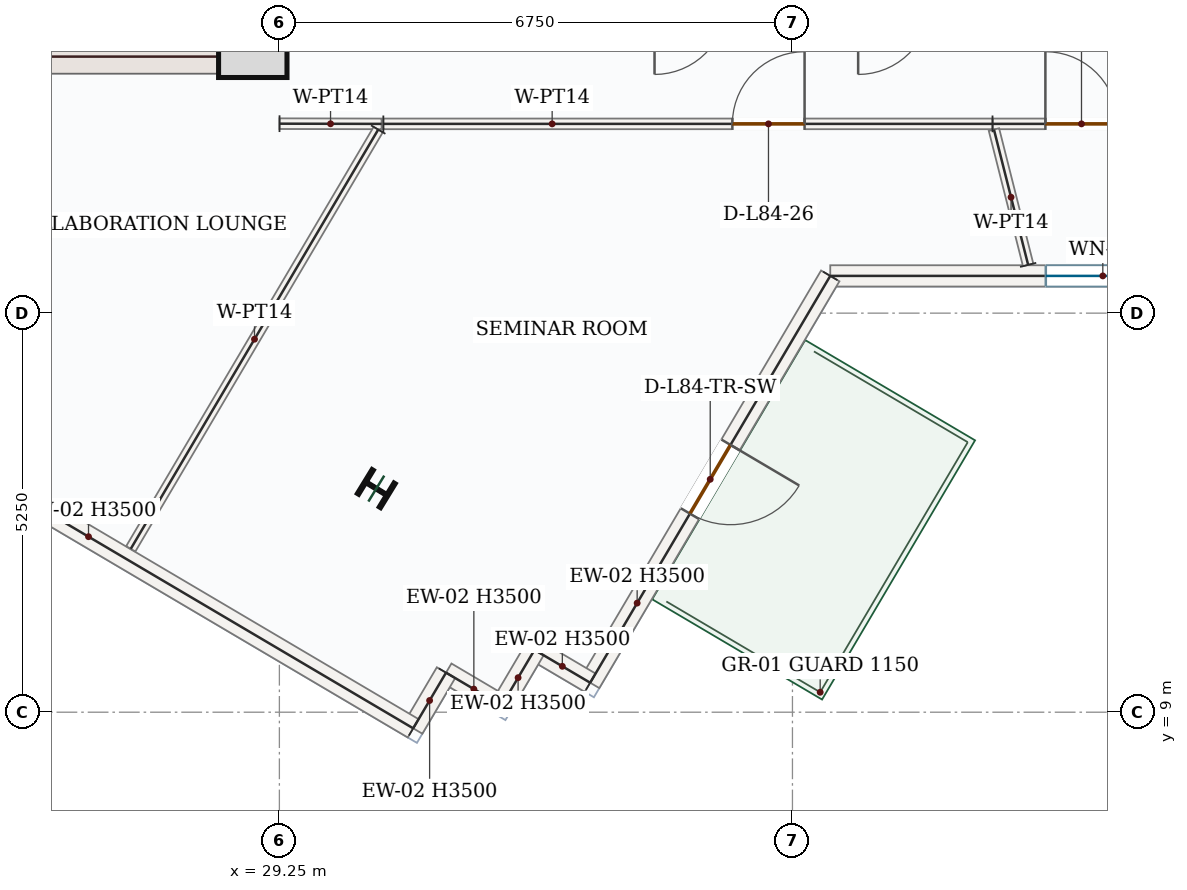
"""IFC4 building model, lengths in metres.
Left out: names, types, materials, properties, quantities, classifications, styles, units other than length and angle.
Written with IfcOpenShell. Run it as: python <this file> out.ifc"""

import sys

from ifc_helpers import new_model, si_unit, direction, frame, frame_2d, origin, origin_2d, place, context, subcontext, project, spatial, rectangle, i_section, extrude, source, transform, mapped, element, fill, save


model = new_model("IFC4")
c1 = context("Model", 3, precision=1e-05, world=origin(), true_north=direction((0.0, 1.0)))
c2 = subcontext(c1, "Body", "Model", "MODEL_VIEW")
j1 = project(units=[si_unit("LENGTHUNIT", "METRE"), si_unit("PLANEANGLEUNIT", "RADIAN")], contexts=[c1])
p1 = place(None, origin())
s1 = spatial("IfcSite", under=j1, at=p1, CompositionType="ELEMENT")
p2 = place(p1, origin())
s2 = spatial("IfcBuilding", under=s1, at=p2, CompositionType="ELEMENT")
p3 = place(p2, frame((0.0, 0.0, 346.05)))
s3 = spatial("IfcBuildingStorey", under=s2, at=p3, CompositionType="ELEMENT", Elevation=346.05)
p4 = place(p3, frame((29.025, 17.4, 0.0), z_axis=(0.0, 0.0, 1.0), x_axis=(0.0, 1.0, 0.0)))
e1 = element("IfcWall", 1, at=p4, inside=s3, PredefinedType="SHEAR", context=c2, shape_type="SweptSolid", body=[
    extrude(rectangle(XDim=8.55, YDim=0.45, at=frame_2d((4.275, 0.0))), origin(), (0.0, 0.0, 1.0), 3.5),
])
p5 = place(p4, frame((6.65, 0.0, 0.0)))
e2 = element("IfcOpeningElement", 2, at=p5, cuts=e1, PredefinedType="OPENING", context=c2, shape_type="SweptSolid", body=[
    extrude(rectangle(XDim=1.1, YDim=2.2, at=frame_2d((0.55, 1.1))), frame((0.0, 0.235, 0.0), z_axis=(0.0, -1.0, 0.0), x_axis=(1.0, 0.0, 0.0)), (0.0, 0.0, 1.0), 0.47),
])
p6 = place(p4, frame((2.7, 0.0, 0.0)))
e3 = element("IfcOpeningElement", 3, at=p6, cuts=e1, PredefinedType="OPENING", context=c2, shape_type="SweptSolid", body=[
    extrude(rectangle(XDim=0.88, YDim=2.1, at=frame_2d((0.44, 1.05))), frame((0.0, 0.235, 0.0), z_axis=(0.0, -1.0, 0.0), x_axis=(1.0, 0.0, 0.0)), (0.0, 0.0, 1.0), 0.47),
])
p7 = place(p4, frame((4.6, 0.0, 0.0)))
e4 = element("IfcOpeningElement", 4, at=p7, cuts=e1, PredefinedType="OPENING", context=c2, shape_type="SweptSolid", body=[
    extrude(rectangle(XDim=0.88, YDim=2.1, at=frame_2d((0.44, 1.05))), frame((0.0, 0.235, 0.0), z_axis=(0.0, -1.0, 0.0), x_axis=(1.0, 0.0, 0.0)), (0.0, 0.0, 1.0), 0.47),
])
m1 = source(origin(), c2, "Body", "SweptSolid", [
    extrude(rectangle(XDim=7.1, YDim=0.45, at=frame_2d((3.55, 0.0))), origin(), (0.0, 0.0, 1.0), 3.5),
])
p8 = place(p3, frame((21.7, 17.625, 0.0), z_axis=(0.0, 0.0, 1.0), x_axis=(1.0, 0.0, 0.0)))
e5 = element("IfcWall", 5, at=p8, inside=s3, PredefinedType="SHEAR", context=c2, shape_type="MappedRepresentation", body=[
    mapped(m1, transform((0.0, 0.0, 0.0), x_axis=(1.0, 0.0, 0.0), y_axis=(0.0, 1.0, 0.0), z_axis=(0.0, 0.0, 1.0), scale=1.0)),
])
m2 = source(origin(), c2, "Body", "SweptSolid", [
    extrude(rectangle(XDim=0.9, YDim=0.9, at=origin_2d()), origin(), (0.0, 0.0, 1.0), 3.75),
])
p9 = place(p3, frame((28.9, 17.8, 0.0), z_axis=(0.0, 0.0, 1.0), x_axis=(1.0, 0.0, 0.0)))
e6 = element("IfcColumn", 6, at=p9, inside=s3, PredefinedType="COLUMN", context=c2, shape_type="MappedRepresentation", body=[
    mapped(m2, transform((0.0, 0.0, 0.0), x_axis=(1.0, 0.0, 0.0), y_axis=(0.0, 1.0, 0.0), z_axis=(0.0, 0.0, 1.0), scale=1.0)),
])
m3 = source(origin(), c2, "Body", "SweptSolid", [
    extrude(i_section(OverallWidth=0.369, OverallDepth=0.356, WebThickness=0.011, FlangeThickness=0.018, FilletRadius=0.018, at=origin_2d()), origin(), (0.0, 0.0, 1.0), 3.75),
])
p10 = place(p3, frame((30.525, 11.942, 0.0), z_axis=(0.0, 0.0, 1.0), x_axis=(0.522498564716, 0.852640164354, 0.0)))
e7 = element("IfcColumn", 7, at=p10, inside=s3, PredefinedType="COLUMN", context=c2, shape_type="MappedRepresentation", body=[
    mapped(m3, transform((0.0, 0.0, 0.0), x_axis=(1.0, 0.0, 0.0), y_axis=(0.0, 1.0, 0.0), z_axis=(0.0, 0.0, 1.0), scale=1.0)),
])
p11 = place(p3, frame((43.669, 14.74, 0.0), z_axis=(0.0, 0.0, 1.0), x_axis=(-1.0, 0.0, 0.0)))
e8 = element("IfcWall", 8, at=p11, inside=s3, PredefinedType="SOLIDWALL", context=c2, shape_type="SweptSolid", body=[
    extrude(rectangle(XDim=7.172, YDim=0.28, at=frame_2d((3.586, 0.0))), origin(), (0.0, 0.0, 1.0), 3.5),
])
p12 = place(p11, frame((2.836, 0.0, 0.85)))
e9 = element("IfcOpeningElement", 9, at=p12, cuts=e8, PredefinedType="OPENING", context=c2, shape_type="SweptSolid", body=[
    extrude(rectangle(XDim=1.5, YDim=1.5, at=frame_2d((0.75, 0.75))), frame((0.0, 0.15, 0.0), z_axis=(0.0, -1.0, 0.0), x_axis=(1.0, 0.0, 0.0)), (0.0, 0.0, 1.0), 0.3),
])
p13 = place(p3, frame((36.497, 14.74, 0.0), z_axis=(0.0, 0.0, 1.0), x_axis=(-0.508266003384, -0.861200133421, 0.0)))
e10 = element("IfcWall", 10, at=p13, inside=s3, PredefinedType="SOLIDWALL", context=c2, shape_type="SweptSolid", body=[
    extrude(rectangle(XDim=6.215, YDim=0.28, at=frame_2d((3.107, 0.0))), origin(), (0.0, 0.0, 1.0), 3.5),
])
p14 = place(p13, frame((2.582, 0.0, 0.0)))
e11 = element("IfcOpeningElement", 11, at=p14, cuts=e10, PredefinedType="OPENING", context=c2, shape_type="SweptSolid", body=[
    extrude(rectangle(XDim=1.05, YDim=2.15, at=frame_2d((0.525, 1.075))), frame((0.0, 0.15, 0.0), z_axis=(0.0, -1.0, 0.0), x_axis=(1.0, 0.0, 0.0)), (0.0, 0.0, 1.0), 0.3),
])
m4 = source(origin(), c2, "Body", "SweptSolid", [
    extrude(rectangle(XDim=0.85, YDim=0.28, at=frame_2d((0.425, 0.0))), origin(), (0.0, 0.0, 1.0), 3.5),
])
for number, where, z_axis, x_axis in (
    (12, (33.339, 9.388, 0.0), (0.0, 0.0, 1.0), (-0.861, 0.508, 0.0)),
    (13, (32.606, 9.82, 0.0), (0.0, 0.0, 1.0), (-0.508, -0.861, 0.0)),
    (14, (32.175, 9.088, 0.0), (0.0, 0.0, 1.0), (-0.861, 0.508, 0.0)),
):
    element("IfcWall", number, at=place(p3, frame(where, z_axis=z_axis, x_axis=x_axis)), inside=s3, PredefinedType="SOLIDWALL", context=c2, shape_type="MappedRepresentation", body=[
        mapped(m4, transform((0.0, 0.0, 0.0), x_axis=(1.0, 0.0, 0.0), y_axis=(0.0, 1.0, 0.0), z_axis=(0.0, 0.0, 1.0), scale=1.0)),
    ])
m5 = source(origin(), c2, "Body", "SweptSolid", [
    extrude(rectangle(XDim=0.85, YDim=0.28, at=frame_2d((0.425, 0.0))), origin(), (0.0, 0.0, 1.0), 3.5),
])
p15 = place(p3, frame((31.442, 9.52, 0.0), z_axis=(0.0, 0.0, 1.0), x_axis=(-0.508187218622, -0.861246626019, 0.0)))
e15 = element("IfcWall", 15, at=p15, inside=s3, PredefinedType="SOLIDWALL", context=c2, shape_type="MappedRepresentation", body=[
    mapped(m5, transform((0.0, 0.0, 0.0), x_axis=(1.0, 0.0, 0.0), y_axis=(0.0, 1.0, 0.0), z_axis=(0.0, 0.0, 1.0), scale=1.0)),
])
m6 = source(origin(), c2, "Body", "SweptSolid", [
    extrude(rectangle(XDim=9.92, YDim=0.28, at=frame_2d((4.96, 0.0))), origin(), (0.0, 0.0, 1.0), 3.5),
])
p16 = place(p3, frame((31.01, 8.788, 0.0), z_axis=(0.0, 0.0, 1.0), x_axis=(-0.861192451778, 0.508279018848, 0.0)))
e16 = element("IfcWall", 16, at=p16, inside=s3, PredefinedType="SOLIDWALL", context=c2, shape_type="MappedRepresentation", body=[
    mapped(m6, transform((0.0, 0.0, 0.0), x_axis=(1.0, 0.0, 0.0), y_axis=(0.0, 1.0, 0.0), z_axis=(0.0, 0.0, 1.0), scale=1.0)),
])
p17 = place(p3, frame((38.632, 16.74, 0.0), z_axis=(0.0, 0.0, 1.0), x_axis=(1.0, 0.0, 0.0)))
e17 = element("IfcWall", 17, at=p17, inside=s3, PredefinedType="PARTITIONING", context=c2, shape_type="SweptSolid", body=[
    extrude(rectangle(XDim=4.112, YDim=0.14, at=frame_2d((2.056, 0.0))), origin(), (0.0, 0.0, 1.0), 3.5),
])
p18 = place(p17, frame((0.696, 0.0, 0.0)))
e18 = element("IfcOpeningElement", 18, at=p18, cuts=e17, PredefinedType="OPENING", context=c2, shape_type="SweptSolid", body=[
    extrude(rectangle(XDim=0.95, YDim=2.15, at=frame_2d((0.475, 1.075))), frame((0.0, 0.08, 0.0), z_axis=(0.0, -1.0, 0.0), x_axis=(1.0, 0.0, 0.0)), (0.0, 0.0, 1.0), 0.16),
])
m7 = source(origin(), c2, "Body", "SweptSolid", [
    extrude(rectangle(XDim=1.836, YDim=0.14, at=frame_2d((0.918, 0.0))), origin(), (0.0, 0.0, 1.0), 3.5),
])
p19 = place(p3, frame((39.101, 14.885, 0.0), z_axis=(0.0, 0.0, 1.0), x_axis=(-0.24494411221, 0.96953719985, 0.0)))
e19 = element("IfcWall", 19, at=p19, inside=s3, PredefinedType="PARTITIONING", context=c2, shape_type="MappedRepresentation", body=[
    mapped(m7, transform((0.0, 0.0, 0.0), x_axis=(1.0, 0.0, 0.0), y_axis=(0.0, 1.0, 0.0), z_axis=(0.0, 0.0, 1.0), scale=1.0)),
])
m8 = source(origin(), c2, "Body", "SweptSolid", [
    extrude(rectangle(XDim=1.343, YDim=0.14, at=frame_2d((0.671, 0.0))), origin(), (0.0, 0.0, 1.0), 3.5),
])
p20 = place(p3, frame((29.252, 16.743, 0.0), z_axis=(0.0, 0.0, 1.0), x_axis=(0.999997619843, -0.002181812989, 0.0)))
e20 = element("IfcWall", 20, at=p20, inside=s3, PredefinedType="PARTITIONING", context=c2, shape_type="MappedRepresentation", body=[
    mapped(m8, transform((0.0, 0.0, 0.0), x_axis=(1.0, 0.0, 0.0), y_axis=(0.0, 1.0, 0.0), z_axis=(0.0, 0.0, 1.0), scale=1.0)),
])
m9 = source(origin(), c2, "Body", "SweptSolid", [
    extrude(rectangle(XDim=6.405, YDim=0.14, at=frame_2d((3.202, 0.0))), origin(), (0.0, 0.0, 1.0), 3.5),
])
p21 = place(p3, frame((30.55, 16.665, 0.0), z_axis=(0.0, 0.0, 1.0), x_axis=(-0.508299006291, -0.861180654801, 0.0)))
e21 = element("IfcWall", 21, at=p21, inside=s3, PredefinedType="PARTITIONING", context=c2, shape_type="MappedRepresentation", body=[
    mapped(m9, transform((0.0, 0.0, 0.0), x_axis=(1.0, 0.0, 0.0), y_axis=(0.0, 1.0, 0.0), z_axis=(0.0, 0.0, 1.0), scale=1.0)),
])
p22 = place(p3, frame((30.618, 16.74, 0.0), z_axis=(0.0, 0.0, 1.0), x_axis=(1.0, 0.0, 0.0)))
e22 = element("IfcWall", 22, at=p22, inside=s3, PredefinedType="PARTITIONING", context=c2, shape_type="SweptSolid", body=[
    extrude(rectangle(XDim=8.014, YDim=0.14, at=frame_2d((4.007, 0.0))), origin(), (0.0, 0.0, 1.0), 3.5),
])
p23 = place(p22, frame((4.592, 0.0, 0.0)))
e23 = element("IfcOpeningElement", 23, at=p23, cuts=e22, PredefinedType="OPENING", context=c2, shape_type="SweptSolid", body=[
    extrude(rectangle(XDim=0.95, YDim=2.15, at=frame_2d((0.475, 1.075))), frame((0.0, 0.08, 0.0), z_axis=(0.0, -1.0, 0.0), x_axis=(1.0, 0.0, 0.0)), (0.0, 0.0, 1.0), 0.16),
])
m10 = source(origin(), c2, "Body", "SweptSolid", [
    extrude(rectangle(XDim=1.5, YDim=1.5, at=frame_2d((0.75, 0.75))), frame((0.0, 0.03, 0.0), z_axis=(0.0, -1.0, 0.0), x_axis=(1.0, 0.0, 0.0)), (0.0, 0.0, 1.0), 0.06),
])
p24 = place(p12, origin())
e24 = element("IfcWindow", 24, at=p24, inside=s3, PartitioningType="SINGLE_PANEL", PredefinedType="WINDOW", context=c2, shape_type="MappedRepresentation", body=[
    mapped(m10, transform((0.0, 0.0, 0.0), x_axis=(1.0, 0.0, 0.0), y_axis=(0.0, 1.0, 0.0), z_axis=(0.0, 0.0, 1.0), scale=1.0)),
])
fill(e9, e24)
m11 = source(origin(), c2, "Body", "SweptSolid", [
    extrude(rectangle(XDim=1.05, YDim=2.15, at=frame_2d((0.525, 1.075))), frame((0.0, 0.025, 0.0), z_axis=(0.0, -1.0, 0.0), x_axis=(1.0, 0.0, 0.0)), (0.0, 0.0, 1.0), 0.05),
])
p25 = place(p14, origin())
e25 = element("IfcDoor", 25, at=p25, inside=s3, OperationType="SINGLE_SWING_LEFT", PredefinedType="DOOR", context=c2, shape_type="MappedRepresentation", body=[
    mapped(m11, transform((0.0, 0.0, 0.0), x_axis=(1.0, 0.0, 0.0), y_axis=(0.0, 1.0, 0.0), z_axis=(0.0, 0.0, 1.0), scale=1.0)),
])
fill(e11, e25)
m12 = source(origin(), c2, "Body", "SweptSolid", [
    extrude(rectangle(XDim=0.95, YDim=2.15, at=frame_2d((0.475, 1.075))), frame((0.0, 0.025, 0.0), z_axis=(0.0, -1.0, 0.0), x_axis=(1.0, 0.0, 0.0)), (0.0, 0.0, 1.0), 0.05),
])
p26 = place(p23, origin())
e26 = element("IfcDoor", 26, at=p26, inside=s3, OperationType="SINGLE_SWING_RIGHT", PredefinedType="DOOR", context=c2, shape_type="MappedRepresentation", body=[
    mapped(m12, transform((0.0, 0.0, 0.0), x_axis=(1.0, 0.0, 0.0), y_axis=(0.0, 1.0, 0.0), z_axis=(0.0, 0.0, 1.0), scale=1.0)),
])
fill(e23, e26)
p27 = place(p18, origin())
e27 = element("IfcDoor", 27, at=p27, inside=s3, OperationType="SINGLE_SWING_LEFT", PredefinedType="DOOR", context=c2, shape_type="MappedRepresentation", body=[
    mapped(m12, transform((0.0, 0.0, 0.0), x_axis=(1.0, 0.0, 0.0), y_axis=(0.0, 1.0, 0.0), z_axis=(0.0, 0.0, 1.0), scale=1.0)),
])
fill(e18, e27)
save(model, sys.argv[1])
